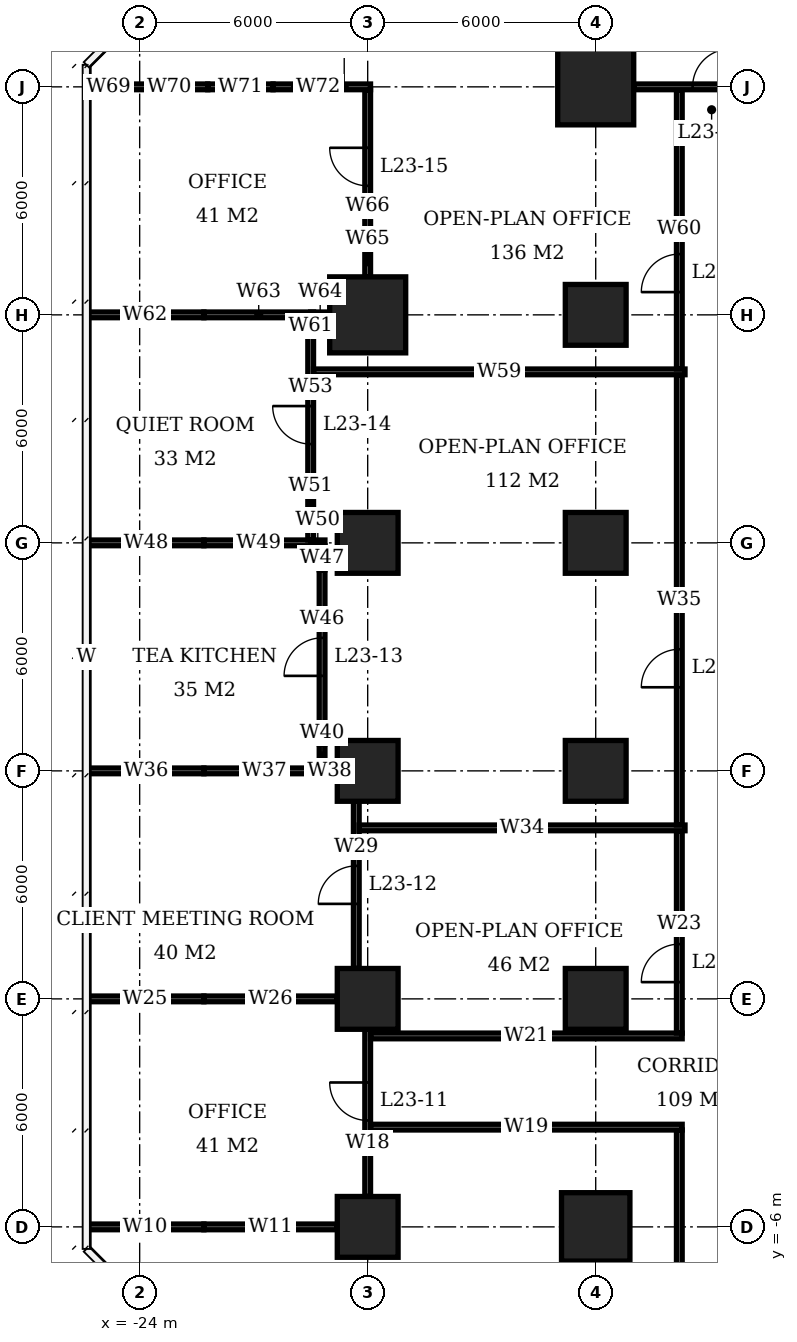
"""IFC4 building model, lengths in metres.
Left out: names, types, materials, properties, quantities, classifications, styles, units other than length and angle.
Written with IfcOpenShell. Run it as: python <this file> out.ifc"""

import sys

from ifc_helpers import new_model, si_unit, direction, frame, frame_2d, origin, origin_2d, place, context, subcontext, project, spatial, rectangle, extrude, element, fill, save


model = new_model("IFC4")
c1 = context("Model", 3, precision=1e-05, world=origin(), true_north=direction((0.0, 1.0)))
c2 = subcontext(c1, "Body", "Model", "MODEL_VIEW")
j1 = project(units=[si_unit("LENGTHUNIT", "METRE"), si_unit("PLANEANGLEUNIT", "RADIAN")], contexts=[c1])
p1 = place(None, origin())
s1 = spatial("IfcSite", under=j1, at=p1, CompositionType="ELEMENT")
p2 = place(p1, origin())
s2 = spatial("IfcBuilding", under=s1, at=p2, CompositionType="ELEMENT")
p3 = place(p2, frame((0.0, 0.0, 97.7)))
s3 = spatial("IfcBuildingStorey", under=s2, at=p3, CompositionType="ELEMENT", Elevation=97.7)
for number, where, z_axis, x_axis in (
    (1, (-18.0, -6.0, 0.0), (0.0, 0.0, 1.0), (1.0, 0.0, 0.0)),
    (2, (-18.0, 0.0, 0.0), (0.0, 0.0, 1.0), (1.0, 0.0, 0.0)),
    (3, (-18.0, 6.0, 0.0), (0.0, 0.0, 1.0), (1.0, 0.0, 0.0)),
    (4, (-18.0, 12.0, 0.0), (0.0, 0.0, 1.0), (1.0, 0.0, 0.0)),
):
    element("IfcColumn", number, at=place(p3, frame(where, z_axis=z_axis, x_axis=x_axis)), inside=s3, PredefinedType="COLUMN", context=c2, shape_type="SweptSolid", body=[
        extrude(rectangle(XDim=1.6, YDim=1.6, at=origin_2d()), origin(), (0.0, 0.0, 1.0), 3.9),
    ])
p4 = place(p3, frame((-18.0, 18.0, 0.0), z_axis=(0.0, 0.0, 1.0), x_axis=(1.0, 0.0, 0.0)))
e5 = element("IfcColumn", 5, at=p4, inside=s3, PredefinedType="COLUMN", context=c2, shape_type="SweptSolid", body=[
    extrude(rectangle(XDim=2.0, YDim=2.0, at=origin_2d()), origin(), (0.0, 0.0, 1.0), 3.9),
])
p5 = place(p3, frame((-12.0, -6.0, 0.0), z_axis=(0.0, 0.0, 1.0), x_axis=(1.0, 0.0, 0.0)))
e6 = element("IfcColumn", 6, at=p5, inside=s3, PredefinedType="COLUMN", context=c2, shape_type="SweptSolid", body=[
    extrude(rectangle(XDim=1.8, YDim=1.8, at=origin_2d()), origin(), (0.0, 0.0, 1.0), 3.9),
])
for number, where, z_axis, x_axis in (
    (7, (-12.0, 0.0, 0.0), (0.0, 0.0, 1.0), (1.0, 0.0, 0.0)),
    (8, (-12.0, 6.0, 0.0), (0.0, 0.0, 1.0), (1.0, 0.0, 0.0)),
    (9, (-12.0, 12.0, 0.0), (0.0, 0.0, 1.0), (1.0, 0.0, 0.0)),
    (10, (-12.0, 18.0, 0.0), (0.0, 0.0, 1.0), (1.0, 0.0, 0.0)),
):
    element("IfcColumn", number, at=place(p3, frame(where, z_axis=z_axis, x_axis=x_axis)), inside=s3, PredefinedType="COLUMN", context=c2, shape_type="SweptSolid", body=[
        extrude(rectangle(XDim=1.6, YDim=1.6, at=origin_2d()), origin(), (0.0, 0.0, 1.0), 3.9),
    ])
p6 = place(p3, frame((-12.0, 24.0, 0.0), z_axis=(0.0, 0.0, 1.0), x_axis=(1.0, 0.0, 0.0)))
e11 = element("IfcColumn", 11, at=p6, inside=s3, PredefinedType="COLUMN", context=c2, shape_type="SweptSolid", body=[
    extrude(rectangle(XDim=2.0, YDim=2.0, at=origin_2d()), origin(), (0.0, 0.0, 1.0), 3.9),
])
p7 = place(p3, frame((-25.4, -6.0, 0.0), z_axis=(0.0, 0.0, 1.0), x_axis=(1.0, 0.0, 0.0)))
e12 = element("IfcWall", 12, at=p7, inside=s3, PredefinedType="PARTITIONING", context=c2, shape_type="SweptSolid", body=[
    extrude(rectangle(XDim=3.09, YDim=0.15, at=frame_2d((1.545, 0.0))), origin(), (0.0, 0.0, 1.0), 3.65),
])
p8 = place(p3, frame((-22.31, -6.0, 0.0), z_axis=(0.0, 0.0, 1.0), x_axis=(1.0, 0.0, 0.0)))
e13 = element("IfcWall", 13, at=p8, inside=s3, PredefinedType="PARTITIONING", context=c2, shape_type="SweptSolid", body=[
    extrude(rectangle(XDim=3.51, YDim=0.15, at=frame_2d((1.755, 0.0))), origin(), (0.0, 0.0, 1.0), 2.65),
])
p9 = place(p3, frame((-25.4, 0.0, 0.0), z_axis=(0.0, 0.0, 1.0), x_axis=(1.0, 0.0, 0.0)))
e14 = element("IfcWall", 14, at=p9, inside=s3, PredefinedType="PARTITIONING", context=c2, shape_type="SweptSolid", body=[
    extrude(rectangle(XDim=3.09, YDim=0.15, at=frame_2d((1.545, 0.0))), origin(), (0.0, 0.0, 1.0), 3.65),
])
p10 = place(p3, frame((-22.31, 0.0, 0.0), z_axis=(0.0, 0.0, 1.0), x_axis=(1.0, 0.0, 0.0)))
e15 = element("IfcWall", 15, at=p10, inside=s3, PredefinedType="PARTITIONING", context=c2, shape_type="SweptSolid", body=[
    extrude(rectangle(XDim=3.51, YDim=0.15, at=frame_2d((1.755, 0.0))), origin(), (0.0, 0.0, 1.0), 2.65),
])
p11 = place(p3, frame((-25.35, 6.0, 0.0), z_axis=(0.0, 0.0, 1.0), x_axis=(1.0, 0.0, 0.0)))
e16 = element("IfcWall", 16, at=p11, inside=s3, PredefinedType="PARTITIONING", context=c2, shape_type="SweptSolid", body=[
    extrude(rectangle(XDim=3.04, YDim=0.15, at=frame_2d((1.52, 0.0))), origin(), (0.0, 0.0, 1.0), 3.65),
])
p12 = place(p3, frame((-22.31, 6.0, 0.0), z_axis=(0.0, 0.0, 1.0), x_axis=(1.0, 0.0, 0.0)))
e17 = element("IfcWall", 17, at=p12, inside=s3, PredefinedType="PARTITIONING", context=c2, shape_type="SweptSolid", body=[
    extrude(rectangle(XDim=3.185, YDim=0.15, at=frame_2d((1.593, 0.0))), origin(), (0.0, 0.0, 1.0), 2.65),
])
p13 = place(p3, frame((-19.2, 6.0, 0.0), z_axis=(0.0, 0.0, 1.0), x_axis=(1.0, 0.0, 0.0)))
e18 = element("IfcWall", 18, at=p13, inside=s3, PredefinedType="PARTITIONING", context=c2, shape_type="SweptSolid", body=[
    extrude(rectangle(XDim=0.4, YDim=0.15, at=frame_2d((0.2, 0.0))), origin(), (0.0, 0.0, 1.0), 2.65),
])
p14 = place(p3, frame((-25.35, 12.0, 0.0), z_axis=(0.0, 0.0, 1.0), x_axis=(1.0, 0.0, 0.0)))
e19 = element("IfcWall", 19, at=p14, inside=s3, PredefinedType="PARTITIONING", context=c2, shape_type="SweptSolid", body=[
    extrude(rectangle(XDim=3.04, YDim=0.15, at=frame_2d((1.52, 0.0))), origin(), (0.0, 0.0, 1.0), 3.65),
])
p15 = place(p3, frame((-22.31, 12.0, 0.0), z_axis=(0.0, 0.0, 1.0), x_axis=(1.0, 0.0, 0.0)))
e20 = element("IfcWall", 20, at=p15, inside=s3, PredefinedType="PARTITIONING", context=c2, shape_type="SweptSolid", body=[
    extrude(rectangle(XDim=2.885, YDim=0.15, at=frame_2d((1.442, 0.0))), origin(), (0.0, 0.0, 1.0), 2.65),
])
p16 = place(p3, frame((-19.5, 12.0, 0.0), z_axis=(0.0, 0.0, 1.0), x_axis=(1.0, 0.0, 0.0)))
e21 = element("IfcWall", 21, at=p16, inside=s3, PredefinedType="PARTITIONING", context=c2, shape_type="SweptSolid", body=[
    extrude(rectangle(XDim=0.375, YDim=0.15, at=frame_2d((0.188, 0.0))), origin(), (0.0, 0.0, 1.0), 2.65),
])
p17 = place(p3, frame((-25.4, 18.0, 0.0), z_axis=(0.0, 0.0, 1.0), x_axis=(1.0, 0.0, 0.0)))
e22 = element("IfcWall", 22, at=p17, inside=s3, PredefinedType="PARTITIONING", context=c2, shape_type="SweptSolid", body=[
    extrude(rectangle(XDim=3.09, YDim=0.15, at=frame_2d((1.545, 0.0))), origin(), (0.0, 0.0, 1.0), 3.65),
])
p18 = place(p3, frame((-22.31, 18.0, 0.0), z_axis=(0.0, 0.0, 1.0), x_axis=(1.0, 0.0, 0.0)))
e23 = element("IfcWall", 23, at=p18, inside=s3, PredefinedType="PARTITIONING", context=c2, shape_type="SweptSolid", body=[
    extrude(rectangle(XDim=2.885, YDim=0.15, at=frame_2d((1.442, 0.0))), origin(), (0.0, 0.0, 1.0), 2.65),
])
p19 = place(p3, frame((-19.5, 18.0, 0.0), z_axis=(0.0, 0.0, 1.0), x_axis=(1.0, 0.0, 0.0)))
e24 = element("IfcWall", 24, at=p19, inside=s3, PredefinedType="PARTITIONING", context=c2, shape_type="SweptSolid", body=[
    extrude(rectangle(XDim=0.5, YDim=0.15, at=frame_2d((0.25, 0.0))), origin(), (0.0, 0.0, 1.0), 2.65),
])
p20 = place(p3, frame((-25.4, 24.0, 0.0), z_axis=(0.0, 0.0, 1.0), x_axis=(1.0, 0.0, 0.0)))
e25 = element("IfcWall", 25, at=p20, inside=s3, PredefinedType="PARTITIONING", context=c2, shape_type="SweptSolid", body=[
    extrude(rectangle(XDim=1.163, YDim=0.15, at=frame_2d((0.582, 0.0))), origin(), (0.0, 0.0, 1.0), 3.65),
])
p21 = place(p3, frame((-24.237, 24.0, 0.0), z_axis=(0.0, 0.0, 1.0), x_axis=(1.0, 0.0, 0.0)))
e26 = element("IfcWall", 26, at=p21, inside=s3, PredefinedType="PARTITIONING", context=c2, shape_type="SweptSolid", body=[
    extrude(rectangle(XDim=2.029, YDim=0.15, at=frame_2d((1.015, 0.0))), origin(), (0.0, 0.0, 1.0), 2.65),
])
p22 = place(p3, frame((-22.208, 24.0, 0.0), z_axis=(0.0, 0.0, 1.0), x_axis=(1.0, 0.0, 0.0)))
e27 = element("IfcWall", 27, at=p22, inside=s3, PredefinedType="PARTITIONING", context=c2, shape_type="SweptSolid", body=[
    extrude(rectangle(XDim=1.718, YDim=0.15, at=frame_2d((0.859, 0.0))), origin(), (0.0, 0.0, 1.0), 3.65),
])
p23 = place(p3, frame((-20.49, 24.0, 0.0), z_axis=(0.0, 0.0, 1.0), x_axis=(1.0, 0.0, 0.0)))
e28 = element("IfcWall", 28, at=p23, inside=s3, PredefinedType="PARTITIONING", context=c2, shape_type="SweptSolid", body=[
    extrude(rectangle(XDim=1.18, YDim=0.15, at=frame_2d((0.59, 0.0))), origin(), (0.0, 0.0, 1.0), 2.65),
])
p24 = place(p3, frame((-19.31, 24.0, 0.0), z_axis=(0.0, 0.0, 1.0), x_axis=(1.0, 0.0, 0.0)))
e29 = element("IfcWall", 29, at=p24, inside=s3, PredefinedType="PARTITIONING", context=c2, shape_type="SweptSolid", body=[
    extrude(rectangle(XDim=1.385, YDim=0.15, at=frame_2d((0.692, 0.0))), origin(), (0.0, 0.0, 1.0), 3.65),
])
p25 = place(p3, frame((-11.0, 24.0, 0.0), z_axis=(0.0, 0.0, 1.0), x_axis=(1.0, 0.0, 0.0)))
e30 = element("IfcWall", 30, at=p25, inside=s3, PredefinedType="PARTITIONING", context=c2, shape_type="SweptSolid", body=[
    extrude(rectangle(XDim=4.1, YDim=0.15, at=frame_2d((2.05, 0.0))), origin(), (0.0, 0.0, 1.0), 3.65),
])
p26 = place(p25, frame((1.55, 0.0, 0.0)))
e31 = element("IfcOpeningElement", 31, at=p26, cuts=e30, PredefinedType="OPENING", context=c2, shape_type="SweptSolid", body=[
    extrude(rectangle(XDim=1.0, YDim=2.1, at=frame_2d((0.5, 1.05))), frame((0.0, 0.085, 0.0), z_axis=(0.0, -1.0, 0.0), x_axis=(1.0, 0.0, 0.0)), (0.0, 0.0, 1.0), 0.17),
])
p27 = place(p3, frame((-19.5, 12.075, 0.0), z_axis=(0.0, 0.0, 1.0), x_axis=(0.0, 1.0, 0.0)))
e32 = element("IfcWall", 32, at=p27, inside=s3, PredefinedType="PARTITIONING", context=c2, shape_type="SweptSolid", body=[
    extrude(rectangle(XDim=0.635, YDim=0.15, at=frame_2d((0.317, 0.0))), origin(), (0.0, 0.0, 1.0), 2.65),
])
p28 = place(p3, frame((-19.5, 12.71, 0.0), z_axis=(0.0, 0.0, 1.0), x_axis=(0.0, 1.0, 0.0)))
e33 = element("IfcWall", 33, at=p28, inside=s3, PredefinedType="PARTITIONING", context=c2, shape_type="SweptSolid", body=[
    extrude(rectangle(XDim=4.78, YDim=0.15, at=frame_2d((2.39, 0.0))), origin(), (0.0, 0.0, 1.0), 3.65),
])
p29 = place(p28, frame((1.89, 0.0, 0.0)))
e34 = element("IfcOpeningElement", 34, at=p29, cuts=e33, PredefinedType="OPENING", context=c2, shape_type="SweptSolid", body=[
    extrude(rectangle(XDim=1.0, YDim=2.1, at=frame_2d((0.5, 1.05))), frame((0.0, 0.085, 0.0), z_axis=(0.0, -1.0, 0.0), x_axis=(1.0, 0.0, 0.0)), (0.0, 0.0, 1.0), 0.17),
])
p30 = place(p3, frame((-19.5, 17.49, 0.0), z_axis=(0.0, 0.0, 1.0), x_axis=(0.0, 1.0, 0.0)))
e35 = element("IfcWall", 35, at=p30, inside=s3, PredefinedType="PARTITIONING", context=c2, shape_type="SweptSolid", body=[
    extrude(rectangle(XDim=0.435, YDim=0.15, at=frame_2d((0.218, 0.0))), origin(), (0.0, 0.0, 1.0), 2.65),
])
p31 = place(p3, frame((-19.2, 6.075, 0.0), z_axis=(0.0, 0.0, 1.0), x_axis=(0.0, 1.0, 0.0)))
e36 = element("IfcWall", 36, at=p31, inside=s3, PredefinedType="PARTITIONING", context=c2, shape_type="SweptSolid", body=[
    extrude(rectangle(XDim=0.635, YDim=0.15, at=frame_2d((0.317, 0.0))), origin(), (0.0, 0.0, 1.0), 2.65),
])
p32 = place(p3, frame((-19.2, 6.71, 0.0), z_axis=(0.0, 0.0, 1.0), x_axis=(0.0, 1.0, 0.0)))
e37 = element("IfcWall", 37, at=p32, inside=s3, PredefinedType="PARTITIONING", context=c2, shape_type="SweptSolid", body=[
    extrude(rectangle(XDim=4.58, YDim=0.15, at=frame_2d((2.29, 0.0))), origin(), (0.0, 0.0, 1.0), 3.65),
])
p33 = place(p32, frame((1.79, 0.0, 0.0)))
e38 = element("IfcOpeningElement", 38, at=p33, cuts=e37, PredefinedType="OPENING", context=c2, shape_type="SweptSolid", body=[
    extrude(rectangle(XDim=1.0, YDim=2.1, at=frame_2d((0.5, 1.05))), frame((0.0, 0.085, 0.0), z_axis=(0.0, -1.0, 0.0), x_axis=(1.0, 0.0, 0.0)), (0.0, 0.0, 1.0), 0.17),
])
p34 = place(p3, frame((-19.2, 11.29, 0.0), z_axis=(0.0, 0.0, 1.0), x_axis=(0.0, 1.0, 0.0)))
e39 = element("IfcWall", 39, at=p34, inside=s3, PredefinedType="PARTITIONING", context=c2, shape_type="SweptSolid", body=[
    extrude(rectangle(XDim=0.635, YDim=0.15, at=frame_2d((0.317, 0.0))), origin(), (0.0, 0.0, 1.0), 2.65),
])
p35 = place(p3, frame((-18.3, 0.8, 0.0), z_axis=(0.0, 0.0, 1.0), x_axis=(0.0, 1.0, 0.0)))
e40 = element("IfcWall", 40, at=p35, inside=s3, PredefinedType="PARTITIONING", context=c2, shape_type="SweptSolid", body=[
    extrude(rectangle(XDim=4.4, YDim=0.15, at=frame_2d((2.2, 0.0))), origin(), (0.0, 0.0, 1.0), 3.65),
])
p36 = place(p35, frame((1.7, 0.0, 0.0)))
e41 = element("IfcOpeningElement", 41, at=p36, cuts=e40, PredefinedType="OPENING", context=c2, shape_type="SweptSolid", body=[
    extrude(rectangle(XDim=1.0, YDim=2.1, at=frame_2d((0.5, 1.05))), frame((0.0, 0.085, 0.0), z_axis=(0.0, -1.0, 0.0), x_axis=(1.0, 0.0, 0.0)), (0.0, 0.0, 1.0), 0.17),
])
p37 = place(p3, frame((-18.0, -5.2, 0.0), z_axis=(0.0, 0.0, 1.0), x_axis=(0.0, 1.0, 0.0)))
e42 = element("IfcWall", 42, at=p37, inside=s3, PredefinedType="PARTITIONING", context=c2, shape_type="SweptSolid", body=[
    extrude(rectangle(XDim=4.4, YDim=0.15, at=frame_2d((2.2, 0.0))), origin(), (0.0, 0.0, 1.0), 3.65),
])
p38 = place(p37, frame((2.0, 0.0, 0.0)))
e43 = element("IfcOpeningElement", 43, at=p38, cuts=e42, PredefinedType="OPENING", context=c2, shape_type="SweptSolid", body=[
    extrude(rectangle(XDim=1.0, YDim=2.1, at=frame_2d((0.5, 1.05))), frame((0.0, 0.085, 0.0), z_axis=(0.0, -1.0, 0.0), x_axis=(1.0, 0.0, 0.0)), (0.0, 0.0, 1.0), 0.17),
])
p39 = place(p3, frame((-18.0, 19.0, 0.0), z_axis=(0.0, 0.0, 1.0), x_axis=(0.0, 1.0, 0.0)))
e44 = element("IfcWall", 44, at=p39, inside=s3, PredefinedType="PARTITIONING", context=c2, shape_type="SweptSolid", body=[
    extrude(rectangle(XDim=0.792, YDim=0.15, at=frame_2d((0.396, 0.0))), origin(), (0.0, 0.0, 1.0), 2.65),
])
p40 = place(p3, frame((-18.0, 19.792, 0.0), z_axis=(0.0, 0.0, 1.0), x_axis=(0.0, 1.0, 0.0)))
e45 = element("IfcWall", 45, at=p40, inside=s3, PredefinedType="PARTITIONING", context=c2, shape_type="SweptSolid", body=[
    extrude(rectangle(XDim=4.133, YDim=0.15, at=frame_2d((2.066, 0.0))), origin(), (0.0, 0.0, 1.0), 3.65),
])
p41 = place(p40, frame((1.604, 0.0, 0.0)))
e46 = element("IfcOpeningElement", 46, at=p41, cuts=e45, PredefinedType="OPENING", context=c2, shape_type="SweptSolid", body=[
    extrude(rectangle(XDim=1.0, YDim=2.1, at=frame_2d((0.5, 1.05))), frame((0.0, 0.085, 0.0), z_axis=(0.0, -1.0, 0.0), x_axis=(1.0, 0.0, 0.0)), (0.0, 0.0, 1.0), 0.17),
])
p42 = place(p3, frame((-19.425, 16.5, 0.0), z_axis=(0.0, 0.0, 1.0), x_axis=(1.0, 0.0, 0.0)))
e47 = element("IfcWall", 47, at=p42, inside=s3, PredefinedType="PARTITIONING", context=c2, shape_type="SweptSolid", body=[
    extrude(rectangle(XDim=9.775, YDim=0.15, at=frame_2d((4.888, 0.0))), origin(), (0.0, 0.0, 1.0), 3.65),
])
p43 = place(p3, frame((-18.225, 4.5, 0.0), z_axis=(0.0, 0.0, 1.0), x_axis=(1.0, 0.0, 0.0)))
e48 = element("IfcWall", 48, at=p43, inside=s3, PredefinedType="PARTITIONING", context=c2, shape_type="SweptSolid", body=[
    extrude(rectangle(XDim=8.575, YDim=0.15, at=frame_2d((4.288, 0.0))), origin(), (0.0, 0.0, 1.0), 3.65),
])
for number, where, z_axis, x_axis in (
    (49, (-17.925, -3.375, 0.0), (0.0, 0.0, 1.0), (1.0, 0.0, 0.0)),
    (50, (-17.925, -0.975, 0.0), (0.0, 0.0, 1.0), (1.0, 0.0, 0.0)),
):
    element("IfcWall", number, at=place(p3, frame(where, z_axis=z_axis, x_axis=x_axis)), inside=s3, PredefinedType="PARTITIONING", context=c2, shape_type="SweptSolid", body=[
        extrude(rectangle(XDim=8.2, YDim=0.15, at=frame_2d((4.1, 0.0))), origin(), (0.0, 0.0, 1.0), 3.65),
    ])
p44 = place(p3, frame((-9.8, -13.4, 0.0), z_axis=(0.0, 0.0, 1.0), x_axis=(0.0, 1.0, 0.0)))
e51 = element("IfcWall", 51, at=p44, inside=s3, PredefinedType="PARTITIONING", context=c2, shape_type="SweptSolid", body=[
    extrude(rectangle(XDim=9.95, YDim=0.15, at=frame_2d((4.975, 0.0))), origin(), (0.0, 0.0, 1.0), 3.65),
])
p45 = place(p44, frame((3.074, 0.0, 0.0)))
e52 = element("IfcOpeningElement", 52, at=p45, cuts=e51, PredefinedType="OPENING", context=c2, shape_type="SweptSolid", body=[
    extrude(rectangle(XDim=1.0, YDim=2.1, at=frame_2d((0.5, 1.05))), frame((0.0, 0.085, 0.0), z_axis=(0.0, -1.0, 0.0), x_axis=(1.0, 0.0, 0.0)), (0.0, 0.0, 1.0), 0.17),
])
p46 = place(p3, frame((-9.8, -0.9, 0.0), z_axis=(0.0, 0.0, 1.0), x_axis=(0.0, 1.0, 0.0)))
e53 = element("IfcWall", 53, at=p46, inside=s3, PredefinedType="PARTITIONING", context=c2, shape_type="SweptSolid", body=[
    extrude(rectangle(XDim=5.325, YDim=0.15, at=frame_2d((2.663, 0.0))), origin(), (0.0, 0.0, 1.0), 3.65),
])
p47 = place(p46, frame((1.341, 0.0, 0.0)))
e54 = element("IfcOpeningElement", 54, at=p47, cuts=e53, PredefinedType="OPENING", context=c2, shape_type="SweptSolid", body=[
    extrude(rectangle(XDim=1.0, YDim=2.1, at=frame_2d((0.5, 1.05))), frame((0.0, 0.085, 0.0), z_axis=(0.0, -1.0, 0.0), x_axis=(1.0, 0.0, 0.0)), (0.0, 0.0, 1.0), 0.17),
])
p48 = place(p3, frame((-9.8, 4.575, 0.0), z_axis=(0.0, 0.0, 1.0), x_axis=(0.0, 1.0, 0.0)))
e55 = element("IfcWall", 55, at=p48, inside=s3, PredefinedType="PARTITIONING", context=c2, shape_type="SweptSolid", body=[
    extrude(rectangle(XDim=11.85, YDim=0.15, at=frame_2d((5.925, 0.0))), origin(), (0.0, 0.0, 1.0), 3.65),
])
p49 = place(p48, frame((3.625, 0.0, 0.0)))
e56 = element("IfcOpeningElement", 56, at=p49, cuts=e55, PredefinedType="OPENING", context=c2, shape_type="SweptSolid", body=[
    extrude(rectangle(XDim=1.0, YDim=2.1, at=frame_2d((0.5, 1.05))), frame((0.0, 0.085, 0.0), z_axis=(0.0, -1.0, 0.0), x_axis=(1.0, 0.0, 0.0)), (0.0, 0.0, 1.0), 0.17),
])
p50 = place(p3, frame((-9.8, 16.575, 0.0), z_axis=(0.0, 0.0, 1.0), x_axis=(0.0, 1.0, 0.0)))
e57 = element("IfcWall", 57, at=p50, inside=s3, PredefinedType="PARTITIONING", context=c2, shape_type="SweptSolid", body=[
    extrude(rectangle(XDim=7.35, YDim=0.15, at=frame_2d((3.675, 0.0))), origin(), (0.0, 0.0, 1.0), 3.65),
])
p51 = place(p50, frame((2.024, 0.0, 0.0)))
e58 = element("IfcOpeningElement", 58, at=p51, cuts=e57, PredefinedType="OPENING", context=c2, shape_type="SweptSolid", body=[
    extrude(rectangle(XDim=1.0, YDim=2.1, at=frame_2d((0.5, 1.05))), frame((0.0, 0.085, 0.0), z_axis=(0.0, -1.0, 0.0), x_axis=(1.0, 0.0, 0.0)), (0.0, 0.0, 1.0), 0.17),
])
p52 = place(p38, origin())
e59 = element("IfcDoor", 59, at=p52, inside=s3, OperationType="SINGLE_SWING_RIGHT", PredefinedType="DOOR", context=c2, shape_type="SweptSolid", body=[
    extrude(rectangle(XDim=1.0, YDim=2.1, at=frame_2d((0.5, 1.05))), frame((0.0, 0.025, 0.0), z_axis=(0.0, -1.0, 0.0), x_axis=(1.0, 0.0, 0.0)), (0.0, 0.0, 1.0), 0.05),
])
fill(e43, e59)
p53 = place(p36, origin())
e60 = element("IfcDoor", 60, at=p53, inside=s3, OperationType="SINGLE_SWING_LEFT", PredefinedType="DOOR", context=c2, shape_type="SweptSolid", body=[
    extrude(rectangle(XDim=1.0, YDim=2.1, at=frame_2d((0.5, 1.05))), frame((0.0, 0.025, 0.0), z_axis=(0.0, -1.0, 0.0), x_axis=(1.0, 0.0, 0.0)), (0.0, 0.0, 1.0), 0.05),
])
fill(e41, e60)
p54 = place(p33, origin())
e61 = element("IfcDoor", 61, at=p54, inside=s3, OperationType="SINGLE_SWING_LEFT", PredefinedType="DOOR", context=c2, shape_type="SweptSolid", body=[
    extrude(rectangle(XDim=1.0, YDim=2.1, at=frame_2d((0.5, 1.05))), frame((0.0, 0.025, 0.0), z_axis=(0.0, -1.0, 0.0), x_axis=(1.0, 0.0, 0.0)), (0.0, 0.0, 1.0), 0.05),
])
fill(e38, e61)
p55 = place(p29, origin())
e62 = element("IfcDoor", 62, at=p55, inside=s3, OperationType="SINGLE_SWING_RIGHT", PredefinedType="DOOR", context=c2, shape_type="SweptSolid", body=[
    extrude(rectangle(XDim=1.0, YDim=2.1, at=frame_2d((0.5, 1.05))), frame((0.0, 0.025, 0.0), z_axis=(0.0, -1.0, 0.0), x_axis=(1.0, 0.0, 0.0)), (0.0, 0.0, 1.0), 0.05),
])
fill(e34, e62)
p56 = place(p41, origin())
e63 = element("IfcDoor", 63, at=p56, inside=s3, OperationType="SINGLE_SWING_RIGHT", PredefinedType="DOOR", context=c2, shape_type="SweptSolid", body=[
    extrude(rectangle(XDim=1.0, YDim=2.1, at=frame_2d((0.5, 1.05))), frame((0.0, 0.025, 0.0), z_axis=(0.0, -1.0, 0.0), x_axis=(1.0, 0.0, 0.0)), (0.0, 0.0, 1.0), 0.05),
])
fill(e46, e63)
p57 = place(p26, origin())
e64 = element("IfcDoor", 64, at=p57, inside=s3, OperationType="SINGLE_SWING_RIGHT", PredefinedType="DOOR", context=c2, shape_type="SweptSolid", body=[
    extrude(rectangle(XDim=1.0, YDim=2.1, at=frame_2d((0.5, 1.05))), frame((0.0, 0.025, 0.0), z_axis=(0.0, -1.0, 0.0), x_axis=(1.0, 0.0, 0.0)), (0.0, 0.0, 1.0), 0.05),
])
fill(e31, e64)
p58 = place(p49, origin())
e65 = element("IfcDoor", 65, at=p58, inside=s3, OperationType="SINGLE_SWING_LEFT", PredefinedType="DOOR", context=c2, shape_type="SweptSolid", body=[
    extrude(rectangle(XDim=1.0, YDim=2.1, at=frame_2d((0.5, 1.05))), frame((0.0, 0.025, 0.0), z_axis=(0.0, -1.0, 0.0), x_axis=(1.0, 0.0, 0.0)), (0.0, 0.0, 1.0), 0.05),
])
fill(e56, e65)
p59 = place(p51, origin())
e66 = element("IfcDoor", 66, at=p59, inside=s3, OperationType="SINGLE_SWING_LEFT", PredefinedType="DOOR", context=c2, shape_type="SweptSolid", body=[
    extrude(rectangle(XDim=1.0, YDim=2.1, at=frame_2d((0.5, 1.05))), frame((0.0, 0.025, 0.0), z_axis=(0.0, -1.0, 0.0), x_axis=(1.0, 0.0, 0.0)), (0.0, 0.0, 1.0), 0.05),
])
fill(e58, e66)
p60 = place(p47, origin())
e67 = element("IfcDoor", 67, at=p60, inside=s3, OperationType="SINGLE_SWING_LEFT", PredefinedType="DOOR", context=c2, shape_type="SweptSolid", body=[
    extrude(rectangle(XDim=1.0, YDim=2.1, at=frame_2d((0.5, 1.05))), frame((0.0, 0.025, 0.0), z_axis=(0.0, -1.0, 0.0), x_axis=(1.0, 0.0, 0.0)), (0.0, 0.0, 1.0), 0.05),
])
fill(e54, e67)
save(model, sys.argv[1])
